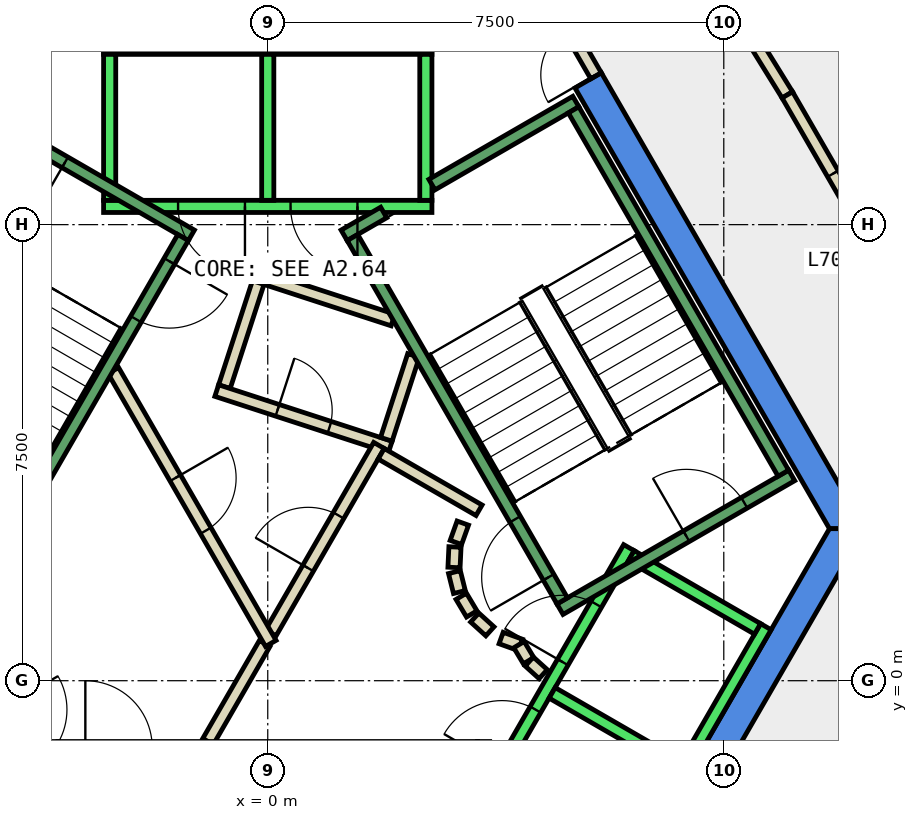
"""IFC4 building model, lengths in metres.
Left out: names, types, materials, properties, quantities, classifications, styles, units other than length and angle.
Written with IfcOpenShell. Run it as: python <this file> out.ifc"""

import sys

from ifc_helpers import new_model, si_unit, direction, frame, frame_2d, origin, place, context, subcontext, project, spatial, polyline, rectangle, outline, extrude, element, fill, save


model = new_model("IFC4")
c1 = context("Model", 3, precision=1e-05, world=origin(), true_north=direction((0.0, 1.0)))
c2 = subcontext(c1, "Body", "Model", "MODEL_VIEW")
j1 = project(units=[si_unit("LENGTHUNIT", "METRE"), si_unit("PLANEANGLEUNIT", "RADIAN")], contexts=[c1])
p1 = place(None, origin())
s1 = spatial("IfcSite", under=j1, at=p1, CompositionType="ELEMENT")
p2 = place(p1, origin())
s2 = spatial("IfcBuilding", under=s1, at=p2, CompositionType="ELEMENT")
p3 = place(p2, frame((0.0, 0.0, 300.8)))
s3 = spatial("IfcBuildingStorey", under=s2, at=p3, CompositionType="ELEMENT", Elevation=300.8)
p4 = place(p3, frame((0.0, 0.0, -0.34)))
e1 = element("IfcWall", 1, at=p4, inside=s3, PredefinedType="SHEAR", context=c2, shape_type="SweptSolid", body=[
    extrude(outline(polyline([(5.486, 9.998), (5.053, 9.748), (9.238, 2.5), (9.815, 2.5), (5.486, 9.998)])), origin(), (0.0, 0.0, 1.0), 3.6),
])
p5 = place(p3, frame((0.0, 0.0, -0.34)))
e2 = element("IfcWall", 2, at=p5, inside=s3, PredefinedType="SHEAR", context=c2, shape_type="SweptSolid", body=[
    extrude(outline(polyline([(4.907, -6.0), (9.815, 2.5), (9.238, 2.5), (4.619, -5.5), (4.907, -6.0)])), origin(), (0.0, 0.0, 1.0), 3.6),
])
p6 = place(p3, frame((2.06, 5.931, 0.0), z_axis=(0.0, 0.0, 1.0), x_axis=(-0.95092855133, 0.309410552932, 0.0)))
e3 = element("IfcWall", 3, at=p6, inside=s3, PredefinedType="PARTITIONING", context=c2, shape_type="SweptSolid", body=[
    extrude(rectangle(XDim=2.399, YDim=0.2, at=frame_2d((1.199, 0.0))), origin(), (0.0, 0.0, 1.0), 3.26),
])
p7 = place(p3, frame((-0.157, 6.547, 0.0), z_axis=(0.0, 0.0, 1.0), x_axis=(-0.308813127339, -0.951122732555, 0.0)))
e4 = element("IfcWall", 4, at=p7, inside=s3, PredefinedType="PARTITIONING", context=c2, shape_type="SweptSolid", body=[
    extrude(rectangle(XDim=1.8, YDim=0.2, at=frame_2d((0.9, 0.0))), origin(), (0.0, 0.0, 1.0), 3.26),
])
p8 = place(p3, frame((-0.839, 4.771, 0.0), z_axis=(0.0, 0.0, 1.0), x_axis=(0.950961084355, -0.309310549515, 0.0)))
e5 = element("IfcWall", 5, at=p8, inside=s3, PredefinedType="PARTITIONING", context=c2, shape_type="SweptSolid", body=[
    extrude(rectangle(XDim=3.0, YDim=0.2, at=frame_2d((1.5, 0.0))), origin(), (0.0, 0.0, 1.0), 3.26),
])
p9 = place(p8, frame((1.05, 0.0, 0.0)))
e6 = element("IfcOpeningElement", 6, at=p9, cuts=e5, PredefinedType="OPENING", context=c2, shape_type="SweptSolid", body=[
    extrude(rectangle(XDim=0.9, YDim=2.1, at=frame_2d((0.45, 1.05))), frame((0.0, 0.11, 0.0), z_axis=(0.0, -1.0, 0.0), x_axis=(1.0, 0.0, 0.0)), (0.0, 0.0, 1.0), 0.22),
])
p10 = place(p3, frame((1.95, 3.97, 0.0), z_axis=(0.0, 0.0, 1.0), x_axis=(0.308583003896, 0.951197418892, 0.0)))
e7 = element("IfcWall", 7, at=p10, inside=s3, PredefinedType="PARTITIONING", context=c2, shape_type="SweptSolid", body=[
    extrude(rectangle(XDim=1.449, YDim=0.2, at=frame_2d((0.724, 0.0))), origin(), (0.0, 0.0, 1.0), 3.26),
])
p11 = place(p3, frame((6.683, 12.642, 0.0), z_axis=(0.0, 0.0, 1.0), x_axis=(0.526290465295, -0.850304854825, 0.0)))
e8 = element("IfcWall", 8, at=p11, inside=s3, PredefinedType="PARTITIONING", context=c2, shape_type="SweptSolid", body=[
    extrude(rectangle(XDim=3.538, YDim=0.2, at=frame_2d((1.769, 0.0))), origin(), (0.0, 0.0, 1.0), 3.26),
])
p12 = place(p3, frame((8.545, 9.634, 0.0), z_axis=(0.0, 0.0, 1.0), x_axis=(0.50008212199, -0.86597798544, 0.0)))
e9 = element("IfcWall", 9, at=p12, inside=s3, PredefinedType="PARTITIONING", context=c2, shape_type="SweptSolid", body=[
    extrude(rectangle(XDim=3.995, YDim=0.2, at=frame_2d((1.998, 0.0))), origin(), (0.0, 0.0, 1.0), 3.26),
])
p13 = place(p12, frame((1.498, 0.0, 0.0)))
e10 = element("IfcOpeningElement", 10, at=p13, cuts=e9, PredefinedType="OPENING", context=c2, shape_type="SweptSolid", body=[
    extrude(rectangle(XDim=1.0, YDim=2.1, at=frame_2d((0.5, 1.05))), frame((0.0, 0.11, 0.0), z_axis=(0.0, -1.0, 0.0), x_axis=(1.0, 0.0, 0.0)), (0.0, 0.0, 1.0), 0.22),
])
p14 = place(p3, frame((-0.982, -1.0, 0.0), z_axis=(0.0, 0.0, 1.0), x_axis=(0.50024047865, 0.865886518847, 0.0)))
e11 = element("IfcWall", 11, at=p14, inside=s3, PredefinedType="PARTITIONING", context=c2, shape_type="SweptSolid", body=[
    extrude(rectangle(XDim=1.863, YDim=0.2, at=frame_2d((0.931, 0.0))), origin(), (0.0, 0.0, 1.0), 3.26),
])
p15 = place(p3, frame((0.05, 0.787, 0.0), z_axis=(0.0, 0.0, 1.0), x_axis=(0.499954076797, 0.866051915934, 0.0)))
e12 = element("IfcWall", 12, at=p15, inside=s3, PredefinedType="PARTITIONING", context=c2, shape_type="SweptSolid", body=[
    extrude(rectangle(XDim=3.558, YDim=0.2, at=frame_2d((1.779, 0.0))), origin(), (0.0, 0.0, 1.0), 3.26),
])
p16 = place(p15, frame((1.229, 0.0, 0.0)))
e13 = element("IfcOpeningElement", 13, at=p16, cuts=e12, PredefinedType="OPENING", context=c2, shape_type="SweptSolid", body=[
    extrude(rectangle(XDim=1.0, YDim=2.1, at=frame_2d((0.5, 1.05))), frame((0.0, 0.11, 0.0), z_axis=(0.0, -1.0, 0.0), x_axis=(1.0, 0.0, 0.0)), (0.0, 0.0, 1.0), 0.22),
])
p17 = place(p3, frame((1.866, 3.732, 0.0), z_axis=(0.0, 0.0, 1.0), x_axis=(0.866043361281, -0.499968895414, 0.0)))
e14 = element("IfcWall", 14, at=p17, inside=s3, PredefinedType="PARTITIONING", context=c2, shape_type="SweptSolid", body=[
    extrude(rectangle(XDim=1.858, YDim=0.2, at=frame_2d((0.929, 0.0))), origin(), (0.0, 0.0, 1.0), 3.26),
])
p18 = place(p3, frame((3.208, 2.592, 0.0), z_axis=(0.0, 0.0, 1.0), x_axis=(-0.337388820924, -0.941365382578, 0.0)))
e15 = element("IfcWall", 15, at=p18, inside=s3, PredefinedType="PARTITIONING", context=c2, shape_type="SweptSolid", body=[
    extrude(rectangle(XDim=0.338, YDim=0.2, at=frame_2d((0.169, 0.0))), origin(), (0.0, 0.0, 1.0), 3.26),
])
p19 = place(p3, frame((3.079, 2.199, 0.0), z_axis=(0.0, 0.0, 1.0), x_axis=(-0.047771483479, -0.998858290933, 0.0)))
e16 = element("IfcWall", 16, at=p19, inside=s3, PredefinedType="PARTITIONING", context=c2, shape_type="SweptSolid", body=[
    extrude(rectangle(XDim=0.337, YDim=0.2, at=frame_2d((0.169, 0.0))), origin(), (0.0, 0.0, 1.0), 3.26),
])
p20 = place(p3, frame((3.07, 1.786, 0.0), z_axis=(0.0, 0.0, 1.0), x_axis=(0.242705583207, -0.970099994784, 0.0)))
e17 = element("IfcWall", 17, at=p20, inside=s3, PredefinedType="PARTITIONING", context=c2, shape_type="SweptSolid", body=[
    extrude(rectangle(XDim=0.338, YDim=0.2, at=frame_2d((0.169, 0.0))), origin(), (0.0, 0.0, 1.0), 3.26),
])
for number, where, z_axis, x_axis in (
    (18, (3.182, 1.388, 0.0), (0.0, 0.0, 1.0), (0.512, -0.859, 0.0)),
    (19, (3.404, 1.039, 0.0), (0.0, 0.0, 1.0), (0.74, -0.672, 0.0)),
):
    element("IfcWall", number, at=place(p3, frame(where, z_axis=z_axis, x_axis=x_axis)), inside=s3, PredefinedType="PARTITIONING", context=c2, shape_type="SweptSolid", body=[
        extrude(rectangle(XDim=0.338, YDim=0.2, at=frame_2d((0.169, 0.0))), origin(), (0.0, 0.0, 1.0), 3.26),
    ])
p21 = place(p3, frame((3.838, 0.702, 0.0), z_axis=(0.0, 0.0, 1.0), x_axis=(0.941035081519, -0.338308993895, 0.0)))
e20 = element("IfcWall", 20, at=p21, inside=s3, PredefinedType="PARTITIONING", context=c2, shape_type="SweptSolid", body=[
    extrude(rectangle(XDim=0.337, YDim=0.2, at=frame_2d((0.168, 0.0))), origin(), (0.0, 0.0, 1.0), 3.26),
])
p22 = place(p3, frame((4.132, 0.593, 0.0), z_axis=(0.0, 0.0, 1.0), x_axis=(0.513561617048, -0.858052717201, 0.0)))
e21 = element("IfcWall", 21, at=p22, inside=s3, PredefinedType="PARTITIONING", context=c2, shape_type="SweptSolid", body=[
    extrude(rectangle(XDim=0.308, YDim=0.2, at=frame_2d((0.154, 0.0))), origin(), (0.0, 0.0, 1.0), 3.26),
])
p23 = place(p3, frame((4.301, 0.315, 0.0), z_axis=(0.0, 0.0, 1.0), x_axis=(0.741798017506, -0.670623367639, 0.0)))
e22 = element("IfcWall", 22, at=p23, inside=s3, PredefinedType="PARTITIONING", context=c2, shape_type="SweptSolid", body=[
    extrude(rectangle(XDim=0.309, YDim=0.2, at=frame_2d((0.154, 0.0))), origin(), (0.0, 0.0, 1.0), 3.26),
])
p24 = place(p3, frame((-2.54, 5.1, 0.0), z_axis=(0.0, 0.0, 1.0), x_axis=(0.499925051871, -0.866068670783, 0.0)))
e23 = element("IfcWall", 23, at=p24, inside=s3, PredefinedType="PARTITIONING", context=c2, shape_type="SweptSolid", body=[
    extrude(rectangle(XDim=5.181, YDim=0.2, at=frame_2d((2.59, 0.0))), origin(), (0.0, 0.0, 1.0), 3.26),
])
p25 = place(p24, frame((2.04, 0.0, 0.0)))
e24 = element("IfcOpeningElement", 24, at=p25, cuts=e23, PredefinedType="OPENING", context=c2, shape_type="SweptSolid", body=[
    extrude(rectangle(XDim=1.0, YDim=2.1, at=frame_2d((0.5, 1.05))), frame((0.0, 0.11, 0.0), z_axis=(0.0, -1.0, 0.0), x_axis=(1.0, 0.0, 0.0)), (0.0, 0.0, 1.0), 0.22),
])
p26 = place(p3, frame((5.399, 9.948, 0.0), z_axis=(0.0, 0.0, 1.0), x_axis=(-0.499882215713, 0.866093395895, 0.0)))
e25 = element("IfcWall", 25, at=p26, inside=s3, PredefinedType="PARTITIONING", context=c2, shape_type="SweptSolid", body=[
    extrude(rectangle(XDim=0.926, YDim=0.2, at=frame_2d((0.463, 0.0))), origin(), (0.0, 0.0, 1.0), 2.4),
])
p27 = place(p26, frame((0.017, 0.0, 0.0)))
e26 = element("IfcOpeningElement", 26, at=p27, cuts=e25, PredefinedType="OPENING", context=c2, shape_type="SweptSolid", body=[
    extrude(rectangle(XDim=0.9, YDim=2.1, at=frame_2d((0.45, 1.05))), frame((0.0, 0.11, 0.0), z_axis=(0.0, -1.0, 0.0), x_axis=(1.0, 0.0, 0.0)), (0.0, 0.0, 1.0), 0.22),
])
p28 = place(p3, frame((2.7, 7.8, 0.0), z_axis=(0.0, 0.0, 1.0), x_axis=(-1.0, 0.0, 0.0)))
e27 = element("IfcWall", 27, at=p28, inside=s3, PredefinedType="STANDARD", context=c2, shape_type="SweptSolid", body=[
    extrude(rectangle(XDim=5.4, YDim=0.2, at=frame_2d((2.7, 0.0))), origin(), (0.0, 0.0, 1.0), 3.26),
])
p29 = place(p28, frame((1.225, 0.0, 0.0)))
e28 = element("IfcOpeningElement", 28, at=p29, cuts=e27, PredefinedType="OPENING", context=c2, shape_type="SweptSolid", body=[
    extrude(rectangle(XDim=1.1, YDim=2.1, at=frame_2d((0.55, 1.05))), frame((0.0, 0.11, 0.0), z_axis=(0.0, -1.0, 0.0), x_axis=(1.0, 0.0, 0.0)), (0.0, 0.0, 1.0), 0.22),
])
p30 = place(p28, frame((3.075, 0.0, 0.0)))
e29 = element("IfcOpeningElement", 29, at=p30, cuts=e27, PredefinedType="OPENING", context=c2, shape_type="SweptSolid", body=[
    extrude(rectangle(XDim=1.1, YDim=2.1, at=frame_2d((0.55, 1.05))), frame((0.0, 0.11, 0.0), z_axis=(0.0, -1.0, 0.0), x_axis=(1.0, 0.0, 0.0)), (0.0, 0.0, 1.0), 0.22),
])
p31 = place(p3, frame((2.7, 10.4, 0.0), z_axis=(0.0, 0.0, 1.0), x_axis=(-1.0, 0.0, 0.0)))
e30 = element("IfcWall", 30, at=p31, inside=s3, PredefinedType="STANDARD", context=c2, shape_type="SweptSolid", body=[
    extrude(rectangle(XDim=5.4, YDim=0.2, at=frame_2d((2.7, 0.0))), origin(), (0.0, 0.0, 1.0), 3.26),
])
for number, where, z_axis, x_axis in (
    (31, (2.6, 7.9, 0.0), (0.0, 0.0, 1.0), (0.0, 1.0, 0.0)),
    (32, (0.0, 7.9, 0.0), (0.0, 0.0, 1.0), (0.0, 1.0, 0.0)),
    (33, (-2.6, 7.9, 0.0), (0.0, 0.0, 1.0), (0.0, 1.0, 0.0)),
):
    element("IfcWall", number, at=place(p3, frame(where, z_axis=z_axis, x_axis=x_axis)), inside=s3, PredefinedType="STANDARD", context=c2, shape_type="SweptSolid", body=[
        extrude(rectangle(XDim=2.4, YDim=0.2, at=frame_2d((1.2, 0.0))), origin(), (0.0, 0.0, 1.0), 3.26),
    ])
p32 = place(p3, frame((-5.94, 2.188, 0.0), z_axis=(0.0, 0.0, 1.0), x_axis=(0.500034260056, -0.866005622828, 0.0)))
e34 = element("IfcWall", 34, at=p32, inside=s3, PredefinedType="STANDARD", context=c2, shape_type="SweptSolid", body=[
    extrude(rectangle(XDim=5.399, YDim=0.2, at=frame_2d((2.7, 0.0))), origin(), (0.0, 0.0, 1.0), 3.26),
])
p33 = place(p32, frame((3.075, 0.0, 0.0)))
e35 = element("IfcOpeningElement", 35, at=p33, cuts=e34, PredefinedType="OPENING", context=c2, shape_type="SweptSolid", body=[
    extrude(rectangle(XDim=1.1, YDim=2.1, at=frame_2d((0.55, 1.05))), frame((0.0, 0.11, 0.0), z_axis=(0.0, -1.0, 0.0), x_axis=(1.0, 0.0, 0.0)), (0.0, 0.0, 1.0), 0.22),
])
p34 = place(p32, frame((1.225, 0.0, 0.0)))
e36 = element("IfcOpeningElement", 36, at=p34, cuts=e34, PredefinedType="OPENING", context=c2, shape_type="SweptSolid", body=[
    extrude(rectangle(XDim=1.1, YDim=2.1, at=frame_2d((0.55, 1.05))), frame((0.0, 0.11, 0.0), z_axis=(0.0, -1.0, 0.0), x_axis=(1.0, 0.0, 0.0)), (0.0, 0.0, 1.0), 0.22),
])
p35 = place(p3, frame((3.24, -2.488, 0.0), z_axis=(0.0, 0.0, 1.0), x_axis=(0.500034260056, 0.866005622828, 0.0)))
e37 = element("IfcWall", 37, at=p35, inside=s3, PredefinedType="STANDARD", context=c2, shape_type="SweptSolid", body=[
    extrude(rectangle(XDim=5.399, YDim=0.2, at=frame_2d((2.7, 0.0))), origin(), (0.0, 0.0, 1.0), 3.26),
])
p36 = place(p35, frame((3.225, 0.0, 0.0)))
e38 = element("IfcOpeningElement", 38, at=p36, cuts=e37, PredefinedType="OPENING", context=c2, shape_type="SweptSolid", body=[
    extrude(rectangle(XDim=1.1, YDim=2.1, at=frame_2d((0.55, 1.05))), frame((0.0, 0.11, 0.0), z_axis=(0.0, -1.0, 0.0), x_axis=(1.0, 0.0, 0.0)), (0.0, 0.0, 1.0), 0.22),
])
p37 = place(p35, frame((1.225, 0.0, 0.0)))
e39 = element("IfcOpeningElement", 39, at=p37, cuts=e37, PredefinedType="OPENING", context=c2, shape_type="SweptSolid", body=[
    extrude(rectangle(XDim=1.1, YDim=2.1, at=frame_2d((0.55, 1.05))), frame((0.0, 0.11, 0.0), z_axis=(0.0, -1.0, 0.0), x_axis=(1.0, 0.0, 0.0)), (0.0, 0.0, 1.0), 0.22),
])
p38 = place(p3, frame((5.492, -3.788, 0.0), z_axis=(0.0, 0.0, 1.0), x_axis=(0.500034260056, 0.866005622828, 0.0)))
e40 = element("IfcWall", 40, at=p38, inside=s3, PredefinedType="STANDARD", context=c2, shape_type="SweptSolid", body=[
    extrude(rectangle(XDim=5.399, YDim=0.2, at=frame_2d((2.7, 0.0))), origin(), (0.0, 0.0, 1.0), 3.26),
])
for number, where, z_axis, x_axis in (
    (41, (4.677, -0.2, 0.0), (0.0, 0.0, 1.0), (0.866, -0.5, 0.0)),
    (42, (5.977, 2.052, 0.0), (0.0, 0.0, 1.0), (0.866, -0.5, 0.0)),
):
    element("IfcWall", number, at=place(p3, frame(where, z_axis=z_axis, x_axis=x_axis)), inside=s3, PredefinedType="STANDARD", context=c2, shape_type="SweptSolid", body=[
        extrude(rectangle(XDim=2.399, YDim=0.2, at=frame_2d((1.2, 0.0))), origin(), (0.0, 0.0, 1.0), 3.26),
    ])
p39 = place(p3, frame((4.806, 1.176, 0.0), z_axis=(0.0, 0.0, 1.0), x_axis=(0.866059941101, 0.499940174841, 0.0)))
e43 = element("IfcWall", 43, at=p39, inside=s3, PredefinedType="STANDARD", context=c2, shape_type="SweptSolid", body=[
    extrude(rectangle(XDim=4.4, YDim=0.2, at=frame_2d((2.2, 0.0))), origin(), (0.0, 0.0, 1.0), 3.26),
])
p40 = place(p39, frame((2.4, 0.0, 0.0)))
e44 = element("IfcOpeningElement", 44, at=p40, cuts=e43, PredefinedType="OPENING", context=c2, shape_type="SweptSolid", body=[
    extrude(rectangle(XDim=1.1, YDim=2.2, at=frame_2d((0.55, 1.1))), frame((0.0, 0.11, 0.0), z_axis=(0.0, -1.0, 0.0), x_axis=(1.0, 0.0, 0.0)), (0.0, 0.0, 1.0), 0.22),
])
p41 = place(p3, frame((2.7, 8.158, 0.0), z_axis=(0.0, 0.0, 1.0), x_axis=(0.86611865017, 0.499838457731, 0.0)))
e45 = element("IfcWall", 45, at=p41, inside=s3, PredefinedType="STANDARD", context=c2, shape_type="SweptSolid", body=[
    extrude(rectangle(XDim=2.733, YDim=0.2, at=frame_2d((1.366, 0.0))), origin(), (0.0, 0.0, 1.0), 3.26),
])
p42 = place(p3, frame((1.256, 7.324, 0.0), z_axis=(0.0, 0.0, 1.0), x_axis=(0.865915093549, 0.500191014278, 0.0)))
e46 = element("IfcWall", 46, at=p42, inside=s3, PredefinedType="STANDARD", context=c2, shape_type="SweptSolid", body=[
    extrude(rectangle(XDim=0.752, YDim=0.2, at=frame_2d((0.376, 0.0))), origin(), (0.0, 0.0, 1.0), 3.26),
])
p43 = place(p3, frame((4.843, 1.312, 0.0), z_axis=(0.0, 0.0, 1.0), x_axis=(-0.499963383562, 0.866046543262, 0.0)))
e47 = element("IfcWall", 47, at=p43, inside=s3, PredefinedType="STANDARD", context=c2, shape_type="SweptSolid", body=[
    extrude(rectangle(XDim=6.9, YDim=0.2, at=frame_2d((3.45, 0.0))), origin(), (0.0, 0.0, 1.0), 3.26),
])
p44 = place(p43, frame((0.45, 0.0, 0.0)))
e48 = element("IfcOpeningElement", 48, at=p44, cuts=e47, PredefinedType="OPENING", context=c2, shape_type="SweptSolid", body=[
    extrude(rectangle(XDim=1.1, YDim=2.2, at=frame_2d((0.55, 1.1))), frame((0.0, 0.11, 0.0), z_axis=(0.0, -1.0, 0.0), x_axis=(1.0, 0.0, 0.0)), (0.0, 0.0, 1.0), 0.22),
])
p45 = place(p3, frame((8.48, 3.412, 0.0), z_axis=(0.0, 0.0, 1.0), x_axis=(-0.499978703459, 0.866037698999, 0.0)))
e49 = element("IfcWall", 49, at=p45, inside=s3, PredefinedType="STANDARD", context=c2, shape_type="SweptSolid", body=[
    extrude(rectangle(XDim=6.9, YDim=0.2, at=frame_2d((3.45, 0.0))), origin(), (0.0, 0.0, 1.0), 3.26),
])
p46 = place(p3, frame((-1.256, 7.324, 0.0), z_axis=(0.0, 0.0, 1.0), x_axis=(-0.866046073146, 0.499964197906, 0.0)))
e50 = element("IfcWall", 50, at=p46, inside=s3, PredefinedType="STANDARD", context=c2, shape_type="SweptSolid", body=[
    extrude(rectangle(XDim=4.4, YDim=0.2, at=frame_2d((2.2, 0.0))), origin(), (0.0, 0.0, 1.0), 3.26),
])
p47 = place(p46, frame((2.4, 0.0, 0.0)))
e51 = element("IfcOpeningElement", 51, at=p47, cuts=e50, PredefinedType="OPENING", context=c2, shape_type="SweptSolid", body=[
    extrude(rectangle(XDim=1.1, YDim=2.2, at=frame_2d((0.55, 1.1))), frame((0.0, 0.11, 0.0), z_axis=(0.0, -1.0, 0.0), x_axis=(1.0, 0.0, 0.0)), (0.0, 0.0, 1.0), 0.22),
])
p48 = place(p3, frame((-1.393, 7.288, 0.0), z_axis=(0.0, 0.0, 1.0), x_axis=(-0.499963383562, -0.866046543262, 0.0)))
e52 = element("IfcWall", 52, at=p48, inside=s3, PredefinedType="STANDARD", context=c2, shape_type="SweptSolid", body=[
    extrude(rectangle(XDim=6.9, YDim=0.2, at=frame_2d((3.45, 0.0))), origin(), (0.0, 0.0, 1.0), 3.26),
])
p49 = place(p48, frame((0.45, 0.0, 0.0)))
e53 = element("IfcOpeningElement", 53, at=p49, cuts=e52, PredefinedType="OPENING", context=c2, shape_type="SweptSolid", body=[
    extrude(rectangle(XDim=1.1, YDim=2.2, at=frame_2d((0.55, 1.1))), frame((0.0, 0.11, 0.0), z_axis=(0.0, -1.0, 0.0), x_axis=(1.0, 0.0, 0.0)), (0.0, 0.0, 1.0), 0.22),
])
p50 = place(p13, origin())
e54 = element("IfcDoor", 54, at=p50, inside=s3, OperationType="SINGLE_SWING_LEFT", PredefinedType="DOOR", context=c2, shape_type="SweptSolid", body=[
    extrude(rectangle(XDim=1.0, YDim=2.1, at=frame_2d((0.5, 1.05))), frame((0.0, 0.025, 0.0), z_axis=(0.0, -1.0, 0.0), x_axis=(1.0, 0.0, 0.0)), (0.0, 0.0, 1.0), 0.05),
])
fill(e10, e54)
p51 = place(p16, origin())
e55 = element("IfcDoor", 55, at=p51, inside=s3, OperationType="SINGLE_SWING_RIGHT", PredefinedType="DOOR", context=c2, shape_type="SweptSolid", body=[
    extrude(rectangle(XDim=1.0, YDim=2.1, at=frame_2d((0.5, 1.05))), frame((0.0, 0.025, 0.0), z_axis=(0.0, -1.0, 0.0), x_axis=(1.0, 0.0, 0.0)), (0.0, 0.0, 1.0), 0.05),
])
fill(e13, e55)
p52 = place(p25, origin())
e56 = element("IfcDoor", 56, at=p52, inside=s3, OperationType="SINGLE_SWING_RIGHT", PredefinedType="DOOR", context=c2, shape_type="SweptSolid", body=[
    extrude(rectangle(XDim=1.0, YDim=2.1, at=frame_2d((0.5, 1.05))), frame((0.0, 0.025, 0.0), z_axis=(0.0, -1.0, 0.0), x_axis=(1.0, 0.0, 0.0)), (0.0, 0.0, 1.0), 0.05),
])
fill(e24, e56)
p53 = place(p9, origin())
e57 = element("IfcDoor", 57, at=p53, inside=s3, OperationType="SINGLE_SWING_LEFT", PredefinedType="DOOR", context=c2, shape_type="SweptSolid", body=[
    extrude(rectangle(XDim=0.9, YDim=2.1, at=frame_2d((0.45, 1.05))), frame((0.0, 0.025, 0.0), z_axis=(0.0, -1.0, 0.0), x_axis=(1.0, 0.0, 0.0)), (0.0, 0.0, 1.0), 0.05),
])
fill(e6, e57)
p54 = place(p27, origin())
e58 = element("IfcDoor", 58, at=p54, inside=s3, OperationType="SINGLE_SWING_LEFT", PredefinedType="DOOR", context=c2, shape_type="SweptSolid", body=[
    extrude(rectangle(XDim=0.9, YDim=2.1, at=frame_2d((0.45, 1.05))), frame((0.0, 0.025, 0.0), z_axis=(0.0, -1.0, 0.0), x_axis=(1.0, 0.0, 0.0)), (0.0, 0.0, 1.0), 0.05),
])
fill(e26, e58)
p55 = place(p29, origin())
e59 = element("IfcDoor", 59, at=p55, inside=s3, OperationType="SLIDING_TO_LEFT", PredefinedType="DOOR", context=c2, shape_type="SweptSolid", body=[
    extrude(rectangle(XDim=1.1, YDim=2.1, at=frame_2d((0.55, 1.05))), frame((0.0, 0.025, 0.0), z_axis=(0.0, -1.0, 0.0), x_axis=(1.0, 0.0, 0.0)), (0.0, 0.0, 1.0), 0.05),
])
fill(e28, e59)
p56 = place(p30, origin())
e60 = element("IfcDoor", 60, at=p56, inside=s3, OperationType="SLIDING_TO_LEFT", PredefinedType="DOOR", context=c2, shape_type="SweptSolid", body=[
    extrude(rectangle(XDim=1.1, YDim=2.1, at=frame_2d((0.55, 1.05))), frame((0.0, 0.025, 0.0), z_axis=(0.0, -1.0, 0.0), x_axis=(1.0, 0.0, 0.0)), (0.0, 0.0, 1.0), 0.05),
])
fill(e29, e60)
p57 = place(p36, origin())
e61 = element("IfcDoor", 61, at=p57, inside=s3, OperationType="SLIDING_TO_LEFT", PredefinedType="DOOR", context=c2, shape_type="SweptSolid", body=[
    extrude(rectangle(XDim=1.1, YDim=2.1, at=frame_2d((0.55, 1.05))), frame((0.0, 0.025, 0.0), z_axis=(0.0, -1.0, 0.0), x_axis=(1.0, 0.0, 0.0)), (0.0, 0.0, 1.0), 0.05),
])
fill(e38, e61)
p58 = place(p37, origin())
e62 = element("IfcDoor", 62, at=p58, inside=s3, OperationType="SLIDING_TO_LEFT", PredefinedType="DOOR", context=c2, shape_type="SweptSolid", body=[
    extrude(rectangle(XDim=1.1, YDim=2.1, at=frame_2d((0.55, 1.05))), frame((0.0, 0.025, 0.0), z_axis=(0.0, -1.0, 0.0), x_axis=(1.0, 0.0, 0.0)), (0.0, 0.0, 1.0), 0.05),
])
fill(e39, e62)
p59 = place(p44, origin())
e63 = element("IfcDoor", 63, at=p59, inside=s3, OperationType="SINGLE_SWING_LEFT", PredefinedType="DOOR", context=c2, shape_type="SweptSolid", body=[
    extrude(rectangle(XDim=1.1, YDim=2.2, at=frame_2d((0.55, 1.1))), frame((0.0, 0.025, 0.0), z_axis=(0.0, -1.0, 0.0), x_axis=(1.0, 0.0, 0.0)), (0.0, 0.0, 1.0), 0.05),
])
fill(e48, e63)
p60 = place(p40, origin())
e64 = element("IfcDoor", 64, at=p60, inside=s3, OperationType="SINGLE_SWING_LEFT", PredefinedType="DOOR", context=c2, shape_type="SweptSolid", body=[
    extrude(rectangle(XDim=1.1, YDim=2.2, at=frame_2d((0.55, 1.1))), frame((0.0, 0.025, 0.0), z_axis=(0.0, -1.0, 0.0), x_axis=(1.0, 0.0, 0.0)), (0.0, 0.0, 1.0), 0.05),
])
fill(e44, e64)
p61 = place(p49, origin())
e65 = element("IfcDoor", 65, at=p61, inside=s3, OperationType="SINGLE_SWING_LEFT", PredefinedType="DOOR", context=c2, shape_type="SweptSolid", body=[
    extrude(rectangle(XDim=1.1, YDim=2.2, at=frame_2d((0.55, 1.1))), frame((0.0, 0.025, 0.0), z_axis=(0.0, -1.0, 0.0), x_axis=(1.0, 0.0, 0.0)), (0.0, 0.0, 1.0), 0.05),
])
fill(e53, e65)
p62 = place(p47, origin())
e66 = element("IfcDoor", 66, at=p62, inside=s3, OperationType="SINGLE_SWING_LEFT", PredefinedType="DOOR", context=c2, shape_type="SweptSolid", body=[
    extrude(rectangle(XDim=1.1, YDim=2.2, at=frame_2d((0.55, 1.1))), frame((0.0, 0.025, 0.0), z_axis=(0.0, -1.0, 0.0), x_axis=(1.0, 0.0, 0.0)), (0.0, 0.0, 1.0), 0.05),
])
fill(e51, e66)
save(model, sys.argv[1])
